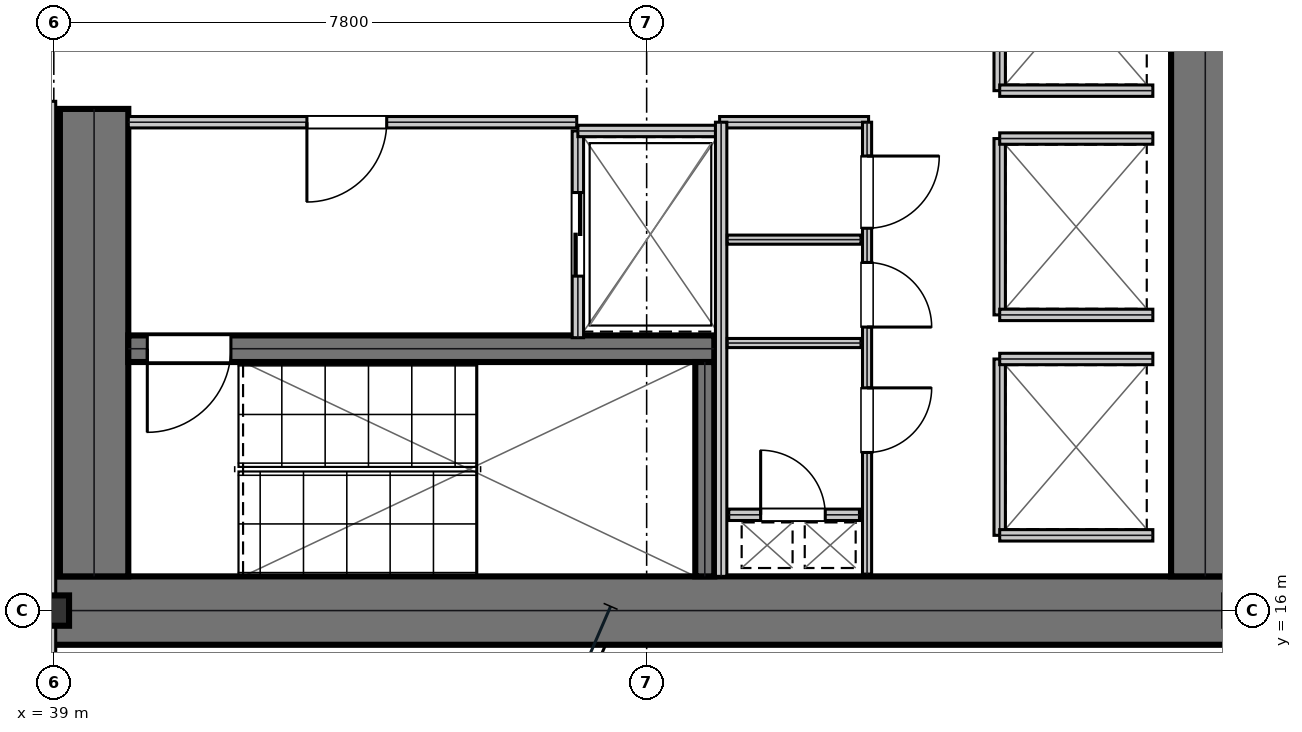
"""IFC4 building model, lengths in metres.
Left out: names, types, materials, properties, quantities, classifications, styles, units other than length and angle.
Written with IfcOpenShell. Run it as: python <this file> out.ifc"""

import sys

from ifc_helpers import new_model, si_unit, direction, frame, frame_2d, origin, origin_2d, place, context, subcontext, project, spatial, rectangle, i_section, extrude, element, fill, save


model = new_model("IFC4")
c1 = context("Model", 3, precision=1e-05, world=origin(), true_north=direction((0.0, 1.0)))
c2 = subcontext(c1, "Body", "Model", "MODEL_VIEW")
j1 = project(units=[si_unit("LENGTHUNIT", "METRE"), si_unit("PLANEANGLEUNIT", "RADIAN")], contexts=[c1])
p1 = place(None, origin())
s1 = spatial("IfcSite", under=j1, at=p1, CompositionType="ELEMENT")
p2 = place(p1, origin())
s2 = spatial("IfcBuilding", under=s1, at=p2, CompositionType="ELEMENT")
p3 = place(p2, frame((0.0, 0.0, 90.45)))
s3 = spatial("IfcBuildingStorey", under=s2, at=p3, CompositionType="ELEMENT", Elevation=90.45)
p4 = place(p3, frame((38.8, 16.0, 0.0), z_axis=(0.0, 0.0, 1.0), x_axis=(1.0, 0.0, 0.0)))
e1 = element("IfcWall", 1, at=p4, inside=s3, PredefinedType="SHEAR", context=c2, shape_type="SweptSolid", body=[
    extrude(rectangle(XDim=16.0, YDim=0.9, at=frame_2d((8.0, 0.0))), origin(), (0.0, 0.0, 1.0), 3.81),
])
p5 = place(p3, frame((39.53, 16.45, 0.0), z_axis=(0.0, 0.0, 1.0), x_axis=(0.0, 1.0, 0.0)))
e2 = element("IfcWall", 2, at=p5, inside=s3, PredefinedType="SHEAR", context=c2, shape_type="SweptSolid", body=[
    extrude(rectangle(XDim=6.15, YDim=0.9, at=frame_2d((3.075, 0.0))), origin(), (0.0, 0.0, 1.0), 3.81),
])
p6 = place(p3, frame((54.15, 16.45, 0.0), z_axis=(0.0, 0.0, 1.0), x_axis=(0.0, 1.0, 0.0)))
e3 = element("IfcWall", 3, at=p6, inside=s3, PredefinedType="SHEAR", context=c2, shape_type="SweptSolid", body=[
    extrude(rectangle(XDim=15.1, YDim=0.9, at=frame_2d((7.55, 0.0))), origin(), (0.0, 0.0, 1.0), 3.81),
])
p7 = place(p3, frame((39.98, 19.445, 0.0), z_axis=(0.0, 0.0, 1.0), x_axis=(1.0, 0.0, 0.0)))
e4 = element("IfcWall", 4, at=p7, inside=s3, PredefinedType="SHEAR", context=c2, shape_type="SweptSolid", body=[
    extrude(rectangle(XDim=7.71, YDim=0.35, at=frame_2d((3.855, 0.0))), origin(), (0.0, 0.0, 1.0), 3.81),
])
p8 = place(p7, frame((0.25, 0.0, 0.0)))
e5 = element("IfcOpeningElement", 5, at=p8, cuts=e4, PredefinedType="OPENING", context=c2, shape_type="SweptSolid", body=[
    extrude(rectangle(XDim=1.1, YDim=2.15, at=frame_2d((0.55, 1.075))), frame((0.0, 0.185, 0.0), z_axis=(0.0, -1.0, 0.0), x_axis=(1.0, 0.0, 0.0)), (0.0, 0.0, 1.0), 0.37),
])
p9 = place(p3, frame((47.565, 16.45, 0.0), z_axis=(0.0, 0.0, 1.0), x_axis=(0.0, 1.0, 0.0)))
e6 = element("IfcWall", 6, at=p9, inside=s3, PredefinedType="SHEAR", context=c2, shape_type="SweptSolid", body=[
    extrude(rectangle(XDim=2.82, YDim=0.25, at=frame_2d((1.41, 0.0))), origin(), (0.0, 0.0, 1.0), 3.81),
])
p10 = place(p3, frame((39.0, 16.0, 0.0), z_axis=(0.0, 0.0, 1.0), x_axis=(1.0, 0.0, 0.0)))
e7 = element("IfcColumn", 7, at=p10, inside=s3, PredefinedType="COLUMN", context=c2, shape_type="SweptSolid", body=[
    extrude(i_section(OverallWidth=0.401, OverallDepth=0.399, WebThickness=0.025, FlangeThickness=0.04, at=origin_2d()), origin(), (0.0, 0.0, 1.0), 4.044),
])
p11 = place(p3, frame((39.98, 22.425, 0.0), z_axis=(0.0, 0.0, 1.0), x_axis=(1.0, 0.0, 0.0)))
e8 = element("IfcWall", 8, at=p11, inside=s3, PredefinedType="PARTITIONING", context=c2, shape_type="SweptSolid", body=[
    extrude(rectangle(XDim=5.9, YDim=0.15, at=frame_2d((2.95, 0.0))), origin(), (0.0, 0.0, 1.0), 3.81),
])
p12 = place(p11, frame((2.35, 0.0, 0.0)))
e9 = element("IfcOpeningElement", 9, at=p12, cuts=e8, PredefinedType="OPENING", context=c2, shape_type="SweptSolid", body=[
    extrude(rectangle(XDim=1.05, YDim=2.15, at=frame_2d((0.525, 1.075))), frame((0.0, 0.085, 0.0), z_axis=(0.0, -1.0, 0.0), x_axis=(1.0, 0.0, 0.0)), (0.0, 0.0, 1.0), 0.17),
])
p13 = place(p3, frame((45.895, 19.59, 0.0), z_axis=(0.0, 0.0, 1.0), x_axis=(0.0, 1.0, 0.0)))
e10 = element("IfcWall", 10, at=p13, inside=s3, PredefinedType="PARTITIONING", context=c2, shape_type="SweptSolid", body=[
    extrude(rectangle(XDim=2.72, YDim=0.15, at=frame_2d((1.36, 0.0))), origin(), (0.0, 0.0, 1.0), 3.81),
])
p14 = place(p13, frame((0.81, 0.0, 0.0)))
e11 = element("IfcOpeningElement", 11, at=p14, cuts=e10, PredefinedType="OPENING", context=c2, shape_type="SweptSolid", body=[
    extrude(rectangle(XDim=1.1, YDim=2.15, at=frame_2d((0.55, 1.075))), frame((0.0, 0.085, 0.0), z_axis=(0.0, -1.0, 0.0), x_axis=(1.0, 0.0, 0.0)), (0.0, 0.0, 1.0), 0.17),
])
p15 = place(p3, frame((45.895, 22.31, 0.0), z_axis=(0.0, 0.0, 1.0), x_axis=(1.0, 0.0, 0.0)))
e12 = element("IfcWall", 12, at=p15, inside=s3, PredefinedType="PARTITIONING", context=c2, shape_type="SweptSolid", body=[
    extrude(rectangle(XDim=1.915, YDim=0.15, at=frame_2d((0.958, 0.0))), origin(), (0.0, 0.0, 1.0), 3.81),
])
p16 = place(p3, frame((51.445, 19.89, 0.0), z_axis=(0.0, 0.0, 1.0), x_axis=(0.0, 1.0, 0.0)))
e13 = element("IfcWall", 13, at=p16, inside=s3, PredefinedType="PARTITIONING", context=c2, shape_type="SweptSolid", body=[
    extrude(rectangle(XDim=2.32, YDim=0.15, at=frame_2d((1.16, 0.0))), origin(), (0.0, 0.0, 1.0), 3.81),
])
for number, where, z_axis, x_axis in (
    (14, (51.445, 19.89, 0.0), (0.0, 0.0, 1.0), (1.0, 0.0, 0.0)),
    (15, (51.445, 22.21, 0.0), (0.0, 0.0, 1.0), (1.0, 0.0, 0.0)),
):
    element("IfcWall", number, at=place(p3, frame(where, z_axis=z_axis, x_axis=x_axis)), inside=s3, PredefinedType="PARTITIONING", context=c2, shape_type="SweptSolid", body=[
        extrude(rectangle(XDim=2.015, YDim=0.15, at=frame_2d((1.007, 0.0))), origin(), (0.0, 0.0, 1.0), 3.81),
    ])
p17 = place(p3, frame((51.445, 22.84, 0.0), z_axis=(0.0, 0.0, 1.0), x_axis=(0.0, 1.0, 0.0)))
e16 = element("IfcWall", 16, at=p17, inside=s3, PredefinedType="PARTITIONING", context=c2, shape_type="SweptSolid", body=[
    extrude(rectangle(XDim=2.32, YDim=0.15, at=frame_2d((1.16, 0.0))), origin(), (0.0, 0.0, 1.0), 3.81),
])
p18 = place(p3, frame((51.445, 22.84, 0.0), z_axis=(0.0, 0.0, 1.0), x_axis=(1.0, 0.0, 0.0)))
e17 = element("IfcWall", 17, at=p18, inside=s3, PredefinedType="PARTITIONING", context=c2, shape_type="SweptSolid", body=[
    extrude(rectangle(XDim=2.015, YDim=0.15, at=frame_2d((1.007, 0.0))), origin(), (0.0, 0.0, 1.0), 3.81),
])
p19 = place(p3, frame((51.445, 16.99, 0.0), z_axis=(0.0, 0.0, 1.0), x_axis=(0.0, 1.0, 0.0)))
e18 = element("IfcWall", 18, at=p19, inside=s3, PredefinedType="PARTITIONING", context=c2, shape_type="SweptSolid", body=[
    extrude(rectangle(XDim=2.32, YDim=0.15, at=frame_2d((1.16, 0.0))), origin(), (0.0, 0.0, 1.0), 3.81),
])
for number, where, z_axis, x_axis in (
    (19, (51.445, 16.99, 0.0), (0.0, 0.0, 1.0), (1.0, 0.0, 0.0)),
    (20, (51.445, 19.31, 0.0), (0.0, 0.0, 1.0), (1.0, 0.0, 0.0)),
):
    element("IfcWall", number, at=place(p3, frame(where, z_axis=z_axis, x_axis=x_axis)), inside=s3, PredefinedType="PARTITIONING", context=c2, shape_type="SweptSolid", body=[
        extrude(rectangle(XDim=2.015, YDim=0.15, at=frame_2d((1.007, 0.0))), origin(), (0.0, 0.0, 1.0), 3.81),
    ])
p20 = place(p3, frame((47.88, 17.26, 0.0), z_axis=(0.0, 0.0, 1.0), x_axis=(1.0, 0.0, 0.0)))
e21 = element("IfcWall", 21, at=p20, inside=s3, PredefinedType="PARTITIONING", context=c2, shape_type="SweptSolid", body=[
    extrude(rectangle(XDim=1.72, YDim=0.15, at=frame_2d((0.86, 0.0))), origin(), (0.0, 0.0, 1.0), 3.81),
])
p21 = place(p20, frame((0.42, 0.0, 0.0)))
e22 = element("IfcOpeningElement", 22, at=p21, cuts=e21, PredefinedType="OPENING", context=c2, shape_type="SweptSolid", body=[
    extrude(rectangle(XDim=0.85, YDim=2.15, at=frame_2d((0.425, 1.075))), frame((0.0, 0.085, 0.0), z_axis=(0.0, -1.0, 0.0), x_axis=(1.0, 0.0, 0.0)), (0.0, 0.0, 1.0), 0.17),
])
p22 = place(p3, frame((47.76, 22.425, 0.0), z_axis=(0.0, 0.0, 1.0), x_axis=(1.0, 0.0, 0.0)))
e23 = element("IfcWall", 23, at=p22, inside=s3, PredefinedType="PARTITIONING", context=c2, shape_type="SweptSolid", body=[
    extrude(rectangle(XDim=1.96, YDim=0.15, at=frame_2d((0.98, 0.0))), origin(), (0.0, 0.0, 1.0), 3.81),
])
p23 = place(p3, frame((47.78, 16.45, 0.0), z_axis=(0.0, 0.0, 1.0), x_axis=(0.0, 1.0, 0.0)))
e24 = element("IfcWall", 24, at=p23, inside=s3, PredefinedType="PARTITIONING", context=c2, shape_type="SweptSolid", body=[
    extrude(rectangle(XDim=5.975, YDim=0.15, at=frame_2d((2.988, 0.0))), origin(), (0.0, 0.0, 1.0), 3.81),
])
for number, where, z_axis, x_axis in (
    (25, (47.86, 19.52, 0.0), (0.0, 0.0, 1.0), (1.0, 0.0, 0.0)),
    (26, (47.86, 20.88, 0.0), (0.0, 0.0, 1.0), (1.0, 0.0, 0.0)),
):
    element("IfcWall", number, at=place(p3, frame(where, z_axis=z_axis, x_axis=x_axis)), inside=s3, PredefinedType="PARTITIONING", context=c2, shape_type="SweptSolid", body=[
        extrude(rectangle(XDim=1.76, YDim=0.12, at=frame_2d((0.88, 0.0))), origin(), (0.0, 0.0, 1.0), 3.81),
    ])
p24 = place(p3, frame((49.7, 16.48, 0.0), z_axis=(0.0, 0.0, 1.0), x_axis=(0.0, 1.0, 0.0)))
e27 = element("IfcWall", 27, at=p24, inside=s3, PredefinedType="PARTITIONING", context=c2, shape_type="SweptSolid", body=[
    extrude(rectangle(XDim=5.945, YDim=0.12, at=frame_2d((2.973, 0.0))), origin(), (0.0, 0.0, 1.0), 3.81),
])
p25 = place(p24, frame((1.6, 0.0, 0.0)))
e28 = element("IfcOpeningElement", 28, at=p25, cuts=e27, PredefinedType="OPENING", context=c2, shape_type="SweptSolid", body=[
    extrude(rectangle(XDim=0.85, YDim=2.15, at=frame_2d((0.425, 1.075))), frame((0.0, 0.07, 0.0), z_axis=(0.0, -1.0, 0.0), x_axis=(1.0, 0.0, 0.0)), (0.0, 0.0, 1.0), 0.14),
])
p26 = place(p24, frame((3.25, 0.0, 0.0)))
e29 = element("IfcOpeningElement", 29, at=p26, cuts=e27, PredefinedType="OPENING", context=c2, shape_type="SweptSolid", body=[
    extrude(rectangle(XDim=0.85, YDim=2.15, at=frame_2d((0.425, 1.075))), frame((0.0, 0.07, 0.0), z_axis=(0.0, -1.0, 0.0), x_axis=(1.0, 0.0, 0.0)), (0.0, 0.0, 1.0), 0.14),
])
p27 = place(p24, frame((4.55, 0.0, 0.0)))
e30 = element("IfcOpeningElement", 30, at=p27, cuts=e27, PredefinedType="OPENING", context=c2, shape_type="SweptSolid", body=[
    extrude(rectangle(XDim=0.95, YDim=2.15, at=frame_2d((0.475, 1.075))), frame((0.0, 0.07, 0.0), z_axis=(0.0, -1.0, 0.0), x_axis=(1.0, 0.0, 0.0)), (0.0, 0.0, 1.0), 0.14),
])
p28 = place(p3, frame((38.95, 14.5, 0.0), z_axis=(0.0, 0.0, 1.0), x_axis=(0.0, 1.0, 0.0)))
e31 = element("IfcWall", 31, at=p28, inside=s3, PredefinedType="PARTITIONING", context=c2, shape_type="SweptSolid", body=[
    extrude(rectangle(XDim=8.2, YDim=0.15, at=frame_2d((4.1, 0.0))), origin(), (0.0, 0.0, 1.0), 3.181),
])
p29 = place(p12, frame((1.05, 0.0, 0.0), z_axis=(0.0, 0.0, 1.0), x_axis=(-1.0, 0.0, 0.0)))
e32 = element("IfcDoor", 32, at=p29, inside=s3, OperationType="SINGLE_SWING_RIGHT", PredefinedType="DOOR", context=c2, shape_type="SweptSolid", body=[
    extrude(rectangle(XDim=1.05, YDim=2.15, at=frame_2d((0.525, 1.075))), frame((0.0, 0.025, 0.0), z_axis=(0.0, -1.0, 0.0), x_axis=(1.0, 0.0, 0.0)), (0.0, 0.0, 1.0), 0.05),
])
fill(e9, e32)
p30 = place(p14, frame((1.1, 0.0, 0.0), z_axis=(0.0, 0.0, 1.0), x_axis=(-1.0, 0.0, 0.0)))
e33 = element("IfcDoor", 33, at=p30, inside=s3, OperationType="DOUBLE_DOOR_SLIDING", PredefinedType="DOOR", context=c2, shape_type="SweptSolid", body=[
    extrude(rectangle(XDim=1.1, YDim=2.15, at=frame_2d((0.55, 1.075))), frame((0.0, 0.025, 0.0), z_axis=(0.0, -1.0, 0.0), x_axis=(1.0, 0.0, 0.0)), (0.0, 0.0, 1.0), 0.05),
])
fill(e11, e33)
p31 = place(p21, origin())
e34 = element("IfcDoor", 34, at=p31, inside=s3, OperationType="SINGLE_SWING_LEFT", PredefinedType="TRAPDOOR", context=c2, shape_type="SweptSolid", body=[
    extrude(rectangle(XDim=0.85, YDim=2.15, at=frame_2d((0.425, 1.075))), frame((0.0, 0.025, 0.0), z_axis=(0.0, -1.0, 0.0), x_axis=(1.0, 0.0, 0.0)), (0.0, 0.0, 1.0), 0.05),
])
fill(e22, e34)
p32 = place(p25, frame((0.85, 0.0, 0.0), z_axis=(0.0, 0.0, 1.0), x_axis=(-1.0, 0.0, 0.0)))
e35 = element("IfcDoor", 35, at=p32, inside=s3, OperationType="SINGLE_SWING_LEFT", PredefinedType="DOOR", context=c2, shape_type="SweptSolid", body=[
    extrude(rectangle(XDim=0.85, YDim=2.15, at=frame_2d((0.425, 1.075))), frame((0.0, 0.025, 0.0), z_axis=(0.0, -1.0, 0.0), x_axis=(1.0, 0.0, 0.0)), (0.0, 0.0, 1.0), 0.05),
])
fill(e28, e35)
p33 = place(p26, frame((0.85, 0.0, 0.0), z_axis=(0.0, 0.0, 1.0), x_axis=(-1.0, 0.0, 0.0)))
e36 = element("IfcDoor", 36, at=p33, inside=s3, OperationType="SINGLE_SWING_RIGHT", PredefinedType="DOOR", context=c2, shape_type="SweptSolid", body=[
    extrude(rectangle(XDim=0.85, YDim=2.15, at=frame_2d((0.425, 1.075))), frame((0.0, 0.025, 0.0), z_axis=(0.0, -1.0, 0.0), x_axis=(1.0, 0.0, 0.0)), (0.0, 0.0, 1.0), 0.05),
])
fill(e29, e36)
p34 = place(p27, frame((0.95, 0.0, 0.0), z_axis=(0.0, 0.0, 1.0), x_axis=(-1.0, 0.0, 0.0)))
e37 = element("IfcDoor", 37, at=p34, inside=s3, OperationType="SINGLE_SWING_LEFT", PredefinedType="DOOR", context=c2, shape_type="SweptSolid", body=[
    extrude(rectangle(XDim=0.95, YDim=2.15, at=frame_2d((0.475, 1.075))), frame((0.0, 0.025, 0.0), z_axis=(0.0, -1.0, 0.0), x_axis=(1.0, 0.0, 0.0)), (0.0, 0.0, 1.0), 0.05),
])
fill(e30, e37)
p35 = place(p8, frame((1.1, 0.0, 0.0), z_axis=(0.0, 0.0, 1.0), x_axis=(-1.0, 0.0, 0.0)))
e38 = element("IfcDoor", 38, at=p35, inside=s3, OperationType="SINGLE_SWING_RIGHT", PredefinedType="DOOR", context=c2, shape_type="SweptSolid", body=[
    extrude(rectangle(XDim=1.1, YDim=2.15, at=frame_2d((0.55, 1.075))), frame((0.0, 0.025, 0.0), z_axis=(0.0, -1.0, 0.0), x_axis=(1.0, 0.0, 0.0)), (0.0, 0.0, 1.0), 0.05),
])
fill(e5, e38)
save(model, sys.argv[1])
